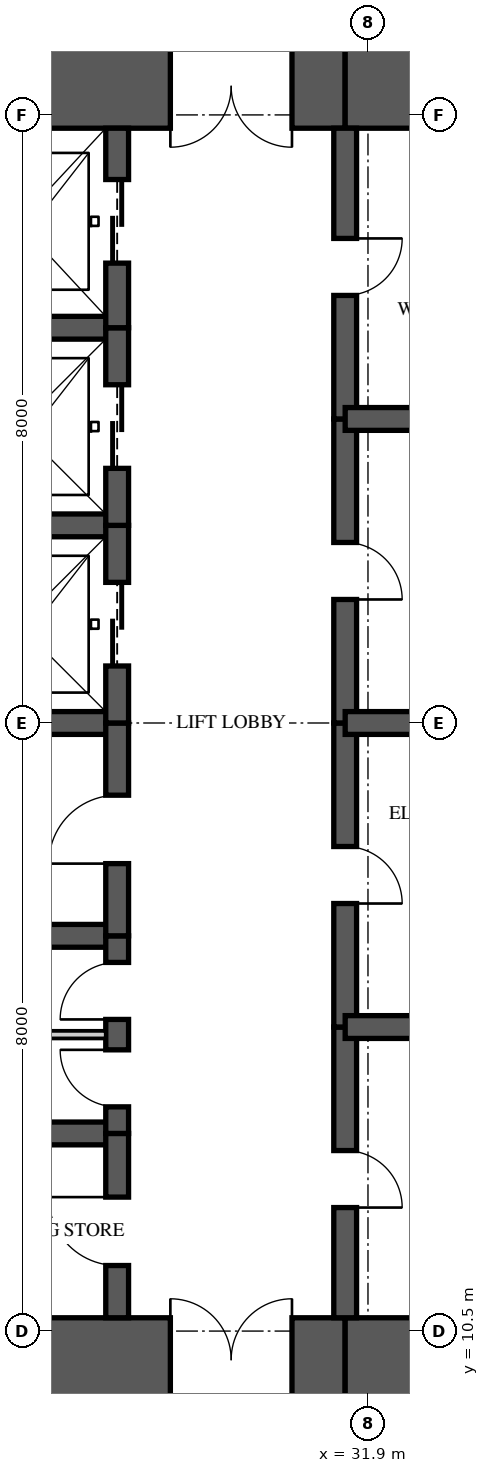
"""IFC4 building model, lengths in metres.
Left out: names, types, materials, properties, quantities, classifications, styles, units other than length and angle.
Written with IfcOpenShell. Run it as: python <this file> out.ifc"""

import sys

from ifc_helpers import new_model, si_unit, direction, frame, frame_2d, origin, place, context, subcontext, project, spatial, rectangle, extrude, element, fill, save


model = new_model("IFC4")
c1 = context("Model", 3, precision=1e-05, world=origin(), true_north=direction((0.0, 1.0)))
c2 = subcontext(c1, "Body", "Model", "MODEL_VIEW")
j1 = project(units=[si_unit("LENGTHUNIT", "METRE"), si_unit("PLANEANGLEUNIT", "RADIAN")], contexts=[c1])
p1 = place(None, origin())
s1 = spatial("IfcSite", under=j1, at=p1, CompositionType="ELEMENT")
p2 = place(p1, origin())
s2 = spatial("IfcBuilding", under=s1, at=p2, CompositionType="ELEMENT")
p3 = place(p2, frame((0.0, 0.0, 221.45)))
s3 = spatial("IfcBuildingStorey", under=s2, at=p3, CompositionType="ELEMENT", Elevation=221.45)
p4 = place(p3, frame((26.0, 10.125, 0.0), z_axis=(0.0, 0.0, 1.0), x_axis=(1.0, 0.0, 0.0)))
e1 = element("IfcWall", 1, at=p4, inside=s3, PredefinedType="SHEAR", context=c2, shape_type="SweptSolid", body=[
    extrude(rectangle(XDim=5.6, YDim=1.1, at=frame_2d((2.8, 0.0))), origin(), (0.0, 0.0, 1.0), 3.5),
])
p5 = place(p4, frame((3.3, 0.0, 0.0)))
e2 = element("IfcOpeningElement", 2, at=p5, cuts=e1, PredefinedType="OPENING", context=c2, shape_type="SweptSolid", body=[
    extrude(rectangle(XDim=1.6, YDim=2.1, at=frame_2d((0.8, 1.05))), frame((0.0, 0.56, 0.0), z_axis=(0.0, -1.0, 0.0), x_axis=(1.0, 0.0, 0.0)), (0.0, 0.0, 1.0), 1.12),
])
for number, where, z_axis, x_axis in (
    (3, (31.6, 10.125, 0.0), (0.0, 0.0, 1.0), (1.0, 0.0, 0.0)),
    (4, (35.9, 26.875, 0.0), (0.0, 0.0, 1.0), (-1.0, 0.0, 0.0)),
):
    element("IfcWall", number, at=place(p3, frame(where, z_axis=z_axis, x_axis=x_axis)), inside=s3, PredefinedType="SHEAR", context=c2, shape_type="SweptSolid", body=[
        extrude(rectangle(XDim=4.3, YDim=1.1, at=frame_2d((2.15, 0.0))), origin(), (0.0, 0.0, 1.0), 3.5),
    ])
p6 = place(p3, frame((31.6, 26.875, 0.0), z_axis=(0.0, 0.0, 1.0), x_axis=(-1.0, 0.0, 0.0)))
e5 = element("IfcWall", 5, at=p6, inside=s3, PredefinedType="SHEAR", context=c2, shape_type="SweptSolid", body=[
    extrude(rectangle(XDim=5.6, YDim=1.1, at=frame_2d((2.8, 0.0))), origin(), (0.0, 0.0, 1.0), 3.5),
])
p7 = place(p6, frame((0.7, 0.0, 0.0)))
e6 = element("IfcOpeningElement", 6, at=p7, cuts=e5, PredefinedType="OPENING", context=c2, shape_type="SweptSolid", body=[
    extrude(rectangle(XDim=1.6, YDim=2.1, at=frame_2d((0.8, 1.05))), frame((0.0, 0.56, 0.0), z_axis=(0.0, -1.0, 0.0), x_axis=(1.0, 0.0, 0.0)), (0.0, 0.0, 1.0), 1.12),
])
p8 = place(p3, frame((28.6, 10.675, 0.0), z_axis=(0.0, 0.0, 1.0), x_axis=(0.0, 1.0, 0.0)))
e7 = element("IfcWall", 7, at=p8, inside=s3, PredefinedType="SHEAR", context=c2, shape_type="SweptSolid", body=[
    extrude(rectangle(XDim=2.425, YDim=0.3, at=frame_2d((1.212, 0.0))), origin(), (0.0, 0.0, 1.0), 3.5),
])
p9 = place(p8, frame((0.688, 0.0, 0.0)))
e8 = element("IfcOpeningElement", 8, at=p9, cuts=e7, PredefinedType="OPENING", context=c2, shape_type="SweptSolid", body=[
    extrude(rectangle(XDim=0.9, YDim=2.1, at=frame_2d((0.45, 1.05))), frame((0.0, 0.16, 0.0), z_axis=(0.0, -1.0, 0.0), x_axis=(1.0, 0.0, 0.0)), (0.0, 0.0, 1.0), 0.32),
])
p10 = place(p3, frame((28.6, 13.1, 0.0), z_axis=(0.0, 0.0, 1.0), x_axis=(0.0, 1.0, 0.0)))
e9 = element("IfcWall", 9, at=p10, inside=s3, PredefinedType="SHEAR", context=c2, shape_type="SweptSolid", body=[
    extrude(rectangle(XDim=2.6, YDim=0.3, at=frame_2d((1.3, 0.0))), origin(), (0.0, 0.0, 1.0), 3.5),
])
p11 = place(p10, frame((0.35, 0.0, 0.0)))
e10 = element("IfcOpeningElement", 10, at=p11, cuts=e9, PredefinedType="OPENING", context=c2, shape_type="SweptSolid", body=[
    extrude(rectangle(XDim=0.75, YDim=2.1, at=frame_2d((0.375, 1.05))), frame((0.0, 0.16, 0.0), z_axis=(0.0, -1.0, 0.0), x_axis=(1.0, 0.0, 0.0)), (0.0, 0.0, 1.0), 0.32),
])
p12 = place(p10, frame((1.5, 0.0, 0.0)))
e11 = element("IfcOpeningElement", 11, at=p12, cuts=e9, PredefinedType="OPENING", context=c2, shape_type="SweptSolid", body=[
    extrude(rectangle(XDim=0.75, YDim=2.1, at=frame_2d((0.375, 1.05))), frame((0.0, 0.16, 0.0), z_axis=(0.0, -1.0, 0.0), x_axis=(1.0, 0.0, 0.0)), (0.0, 0.0, 1.0), 0.32),
])
p13 = place(p3, frame((28.6, 15.7, 0.0), z_axis=(0.0, 0.0, 1.0), x_axis=(0.0, 1.0, 0.0)))
e12 = element("IfcWall", 12, at=p13, inside=s3, PredefinedType="SHEAR", context=c2, shape_type="SweptSolid", body=[
    extrude(rectangle(XDim=2.8, YDim=0.3, at=frame_2d((1.4, 0.0))), origin(), (0.0, 0.0, 1.0), 3.5),
])
p14 = place(p13, frame((0.95, 0.0, 0.0)))
e13 = element("IfcOpeningElement", 13, at=p14, cuts=e12, PredefinedType="OPENING", context=c2, shape_type="SweptSolid", body=[
    extrude(rectangle(XDim=0.9, YDim=2.1, at=frame_2d((0.45, 1.05))), frame((0.0, 0.16, 0.0), z_axis=(0.0, -1.0, 0.0), x_axis=(1.0, 0.0, 0.0)), (0.0, 0.0, 1.0), 0.32),
])
p15 = place(p3, frame((28.6, 18.5, 0.0), z_axis=(0.0, 0.0, 1.0), x_axis=(0.0, 1.0, 0.0)))
e14 = element("IfcWall", 14, at=p15, inside=s3, PredefinedType="SHEAR", context=c2, shape_type="SweptSolid", body=[
    extrude(rectangle(XDim=2.6, YDim=0.3, at=frame_2d((1.3, 0.0))), origin(), (0.0, 0.0, 1.0), 3.5),
])
p16 = place(p15, frame((0.75, 0.0, 0.0)))
e15 = element("IfcOpeningElement", 15, at=p16, cuts=e14, PredefinedType="OPENING", context=c2, shape_type="SweptSolid", body=[
    extrude(rectangle(XDim=1.1, YDim=2.1, at=frame_2d((0.55, 1.05))), frame((0.0, 0.16, 0.0), z_axis=(0.0, -1.0, 0.0), x_axis=(1.0, 0.0, 0.0)), (0.0, 0.0, 1.0), 0.32),
])
p17 = place(p3, frame((28.6, 21.1, 0.0), z_axis=(0.0, 0.0, 1.0), x_axis=(0.0, 1.0, 0.0)))
e16 = element("IfcWall", 16, at=p17, inside=s3, PredefinedType="SHEAR", context=c2, shape_type="SweptSolid", body=[
    extrude(rectangle(XDim=2.6, YDim=0.3, at=frame_2d((1.3, 0.0))), origin(), (0.0, 0.0, 1.0), 3.5),
])
p18 = place(p17, frame((0.75, 0.0, 0.0)))
e17 = element("IfcOpeningElement", 17, at=p18, cuts=e16, PredefinedType="OPENING", context=c2, shape_type="SweptSolid", body=[
    extrude(rectangle(XDim=1.1, YDim=2.1, at=frame_2d((0.55, 1.05))), frame((0.0, 0.16, 0.0), z_axis=(0.0, -1.0, 0.0), x_axis=(1.0, 0.0, 0.0)), (0.0, 0.0, 1.0), 0.32),
])
p19 = place(p3, frame((28.6, 23.7, 0.0), z_axis=(0.0, 0.0, 1.0), x_axis=(0.0, 1.0, 0.0)))
e18 = element("IfcWall", 18, at=p19, inside=s3, PredefinedType="SHEAR", context=c2, shape_type="SweptSolid", body=[
    extrude(rectangle(XDim=2.625, YDim=0.3, at=frame_2d((1.312, 0.0))), origin(), (0.0, 0.0, 1.0), 3.5),
])
p20 = place(p19, frame((0.85, 0.0, 0.0)))
e19 = element("IfcOpeningElement", 19, at=p20, cuts=e18, PredefinedType="OPENING", context=c2, shape_type="SweptSolid", body=[
    extrude(rectangle(XDim=1.1, YDim=2.1, at=frame_2d((0.55, 1.05))), frame((0.0, 0.16, 0.0), z_axis=(0.0, -1.0, 0.0), x_axis=(1.0, 0.0, 0.0)), (0.0, 0.0, 1.0), 0.32),
])
p21 = place(p3, frame((31.6, 10.675, 0.0), z_axis=(0.0, 0.0, 1.0), x_axis=(0.0, 1.0, 0.0)))
e20 = element("IfcWall", 20, at=p21, inside=s3, PredefinedType="SHEAR", context=c2, shape_type="SweptSolid", body=[
    extrude(rectangle(XDim=3.825, YDim=0.3, at=frame_2d((1.913, 0.0))), origin(), (0.0, 0.0, 1.0), 3.5),
])
p22 = place(p21, frame((1.45, 0.0, 0.0)))
e21 = element("IfcOpeningElement", 21, at=p22, cuts=e20, PredefinedType="OPENING", context=c2, shape_type="SweptSolid", body=[
    extrude(rectangle(XDim=0.75, YDim=2.1, at=frame_2d((0.375, 1.05))), frame((0.0, 0.16, 0.0), z_axis=(0.0, -1.0, 0.0), x_axis=(1.0, 0.0, 0.0)), (0.0, 0.0, 1.0), 0.32),
])
p23 = place(p3, frame((31.6, 14.5, 0.0), z_axis=(0.0, 0.0, 1.0), x_axis=(0.0, 1.0, 0.0)))
e22 = element("IfcWall", 22, at=p23, inside=s3, PredefinedType="SHEAR", context=c2, shape_type="SweptSolid", body=[
    extrude(rectangle(XDim=4.0, YDim=0.3, at=frame_2d((2.0, 0.0))), origin(), (0.0, 0.0, 1.0), 3.5),
])
p24 = place(p23, frame((1.625, 0.0, 0.0)))
e23 = element("IfcOpeningElement", 23, at=p24, cuts=e22, PredefinedType="OPENING", context=c2, shape_type="SweptSolid", body=[
    extrude(rectangle(XDim=0.75, YDim=2.1, at=frame_2d((0.375, 1.05))), frame((0.0, 0.16, 0.0), z_axis=(0.0, -1.0, 0.0), x_axis=(1.0, 0.0, 0.0)), (0.0, 0.0, 1.0), 0.32),
])
p25 = place(p3, frame((31.6, 18.5, 0.0), z_axis=(0.0, 0.0, 1.0), x_axis=(0.0, 1.0, 0.0)))
e24 = element("IfcWall", 24, at=p25, inside=s3, PredefinedType="SHEAR", context=c2, shape_type="SweptSolid", body=[
    extrude(rectangle(XDim=4.0, YDim=0.3, at=frame_2d((2.0, 0.0))), origin(), (0.0, 0.0, 1.0), 3.5),
])
p26 = place(p25, frame((1.625, 0.0, 0.0)))
e25 = element("IfcOpeningElement", 25, at=p26, cuts=e24, PredefinedType="OPENING", context=c2, shape_type="SweptSolid", body=[
    extrude(rectangle(XDim=0.75, YDim=2.1, at=frame_2d((0.375, 1.05))), frame((0.0, 0.16, 0.0), z_axis=(0.0, -1.0, 0.0), x_axis=(1.0, 0.0, 0.0)), (0.0, 0.0, 1.0), 0.32),
])
p27 = place(p3, frame((31.6, 22.5, 0.0), z_axis=(0.0, 0.0, 1.0), x_axis=(0.0, 1.0, 0.0)))
e26 = element("IfcWall", 26, at=p27, inside=s3, PredefinedType="SHEAR", context=c2, shape_type="SweptSolid", body=[
    extrude(rectangle(XDim=3.825, YDim=0.3, at=frame_2d((1.913, 0.0))), origin(), (0.0, 0.0, 1.0), 3.5),
])
p28 = place(p27, frame((1.625, 0.0, 0.0)))
e27 = element("IfcOpeningElement", 27, at=p28, cuts=e26, PredefinedType="OPENING", context=c2, shape_type="SweptSolid", body=[
    extrude(rectangle(XDim=0.75, YDim=2.1, at=frame_2d((0.375, 1.05))), frame((0.0, 0.16, 0.0), z_axis=(0.0, -1.0, 0.0), x_axis=(1.0, 0.0, 0.0)), (0.0, 0.0, 1.0), 0.32),
])
for number, where, z_axis, x_axis in (
    (28, (26.0, 13.1, 0.0), (0.0, 0.0, 1.0), (1.0, 0.0, 0.0)),
    (29, (26.0, 15.7, 0.0), (0.0, 0.0, 1.0), (1.0, 0.0, 0.0)),
    (30, (26.0, 18.5, 0.0), (0.0, 0.0, 1.0), (1.0, 0.0, 0.0)),
    (31, (26.0, 21.1, 0.0), (0.0, 0.0, 1.0), (1.0, 0.0, 0.0)),
    (32, (26.0, 23.7, 0.0), (0.0, 0.0, 1.0), (1.0, 0.0, 0.0)),
):
    element("IfcWall", number, at=place(p3, frame(where, z_axis=z_axis, x_axis=x_axis)), inside=s3, PredefinedType="SHEAR", context=c2, shape_type="SweptSolid", body=[
        extrude(rectangle(XDim=2.6, YDim=0.3, at=frame_2d((1.3, 0.0))), origin(), (0.0, 0.0, 1.0), 3.5),
    ])
for number, where, z_axis, x_axis in (
    (33, (31.6, 14.5, 0.0), (0.0, 0.0, 1.0), (1.0, 0.0, 0.0)),
    (34, (31.6, 18.5, 0.0), (0.0, 0.0, 1.0), (1.0, 0.0, 0.0)),
    (35, (31.6, 22.5, 0.0), (0.0, 0.0, 1.0), (1.0, 0.0, 0.0)),
):
    element("IfcWall", number, at=place(p3, frame(where, z_axis=z_axis, x_axis=x_axis)), inside=s3, PredefinedType="SHEAR", context=c2, shape_type="SweptSolid", body=[
        extrude(rectangle(XDim=4.3, YDim=0.3, at=frame_2d((2.15, 0.0))), origin(), (0.0, 0.0, 1.0), 3.5),
    ])
p29 = place(p3, frame((26.15, 14.4, 0.0), z_axis=(0.0, 0.0, 1.0), x_axis=(1.0, 0.0, 0.0)))
e36 = element("IfcWall", 36, at=p29, inside=s3, PredefinedType="PARTITIONING", context=c2, shape_type="SweptSolid", body=[
    extrude(rectangle(XDim=2.3, YDim=0.1, at=frame_2d((1.15, 0.0))), origin(), (0.0, 0.0, 1.0), 3.26),
])
p30 = place(p16, origin())
e37 = element("IfcDoor", 37, at=p30, inside=s3, OperationType="SLIDING_TO_LEFT", PredefinedType="DOOR", context=c2, shape_type="SweptSolid", body=[
    extrude(rectangle(XDim=1.1, YDim=2.1, at=frame_2d((0.55, 1.05))), frame((0.0, 0.025, 0.0), z_axis=(0.0, -1.0, 0.0), x_axis=(1.0, 0.0, 0.0)), (0.0, 0.0, 1.0), 0.05),
])
fill(e15, e37)
p31 = place(p18, origin())
e38 = element("IfcDoor", 38, at=p31, inside=s3, OperationType="SLIDING_TO_LEFT", PredefinedType="DOOR", context=c2, shape_type="SweptSolid", body=[
    extrude(rectangle(XDim=1.1, YDim=2.1, at=frame_2d((0.55, 1.05))), frame((0.0, 0.025, 0.0), z_axis=(0.0, -1.0, 0.0), x_axis=(1.0, 0.0, 0.0)), (0.0, 0.0, 1.0), 0.05),
])
fill(e17, e38)
p32 = place(p20, origin())
e39 = element("IfcDoor", 39, at=p32, inside=s3, OperationType="SLIDING_TO_LEFT", PredefinedType="DOOR", context=c2, shape_type="SweptSolid", body=[
    extrude(rectangle(XDim=1.1, YDim=2.1, at=frame_2d((0.55, 1.05))), frame((0.0, 0.025, 0.0), z_axis=(0.0, -1.0, 0.0), x_axis=(1.0, 0.0, 0.0)), (0.0, 0.0, 1.0), 0.05),
])
fill(e19, e39)
p33 = place(p9, origin())
e40 = element("IfcDoor", 40, at=p33, inside=s3, OperationType="SINGLE_SWING_RIGHT", PredefinedType="DOOR", context=c2, shape_type="SweptSolid", body=[
    extrude(rectangle(XDim=0.9, YDim=2.1, at=frame_2d((0.45, 1.05))), frame((0.0, 0.025, 0.0), z_axis=(0.0, -1.0, 0.0), x_axis=(1.0, 0.0, 0.0)), (0.0, 0.0, 1.0), 0.05),
])
fill(e8, e40)
p34 = place(p11, origin())
e41 = element("IfcDoor", 41, at=p34, inside=s3, OperationType="SINGLE_SWING_RIGHT", PredefinedType="DOOR", context=c2, shape_type="SweptSolid", body=[
    extrude(rectangle(XDim=0.75, YDim=2.1, at=frame_2d((0.375, 1.05))), frame((0.0, 0.025, 0.0), z_axis=(0.0, -1.0, 0.0), x_axis=(1.0, 0.0, 0.0)), (0.0, 0.0, 1.0), 0.05),
])
fill(e10, e41)
p35 = place(p12, origin())
e42 = element("IfcDoor", 42, at=p35, inside=s3, OperationType="SINGLE_SWING_LEFT", PredefinedType="DOOR", context=c2, shape_type="SweptSolid", body=[
    extrude(rectangle(XDim=0.75, YDim=2.1, at=frame_2d((0.375, 1.05))), frame((0.0, 0.025, 0.0), z_axis=(0.0, -1.0, 0.0), x_axis=(1.0, 0.0, 0.0)), (0.0, 0.0, 1.0), 0.05),
])
fill(e11, e42)
p36 = place(p14, origin())
e43 = element("IfcDoor", 43, at=p36, inside=s3, OperationType="SINGLE_SWING_LEFT", PredefinedType="DOOR", context=c2, shape_type="SweptSolid", body=[
    extrude(rectangle(XDim=0.9, YDim=2.1, at=frame_2d((0.45, 1.05))), frame((0.0, 0.025, 0.0), z_axis=(0.0, -1.0, 0.0), x_axis=(1.0, 0.0, 0.0)), (0.0, 0.0, 1.0), 0.05),
])
fill(e13, e43)
p37 = place(p5, origin())
e44 = element("IfcDoor", 44, at=p37, inside=s3, OperationType="DOUBLE_DOOR_SINGLE_SWING", PredefinedType="DOOR", context=c2, shape_type="SweptSolid", body=[
    extrude(rectangle(XDim=1.6, YDim=2.1, at=frame_2d((0.8, 1.05))), frame((0.0, 0.025, 0.0), z_axis=(0.0, -1.0, 0.0), x_axis=(1.0, 0.0, 0.0)), (0.0, 0.0, 1.0), 0.05),
])
fill(e2, e44)
p38 = place(p7, origin())
e45 = element("IfcDoor", 45, at=p38, inside=s3, OperationType="DOUBLE_DOOR_SINGLE_SWING", PredefinedType="DOOR", context=c2, shape_type="SweptSolid", body=[
    extrude(rectangle(XDim=1.6, YDim=2.1, at=frame_2d((0.8, 1.05))), frame((0.0, 0.025, 0.0), z_axis=(0.0, -1.0, 0.0), x_axis=(1.0, 0.0, 0.0)), (0.0, 0.0, 1.0), 0.05),
])
fill(e6, e45)
p39 = place(p22, frame((0.75, 0.0, 0.0), z_axis=(0.0, 0.0, 1.0), x_axis=(-1.0, 0.0, 0.0)))
e46 = element("IfcDoor", 46, at=p39, inside=s3, OperationType="SINGLE_SWING_RIGHT", PredefinedType="DOOR", context=c2, shape_type="SweptSolid", body=[
    extrude(rectangle(XDim=0.75, YDim=2.1, at=frame_2d((0.375, 1.05))), frame((0.0, 0.025, 0.0), z_axis=(0.0, -1.0, 0.0), x_axis=(1.0, 0.0, 0.0)), (0.0, 0.0, 1.0), 0.05),
])
fill(e21, e46)
p40 = place(p24, frame((0.75, 0.0, 0.0), z_axis=(0.0, 0.0, 1.0), x_axis=(-1.0, 0.0, 0.0)))
e47 = element("IfcDoor", 47, at=p40, inside=s3, OperationType="SINGLE_SWING_RIGHT", PredefinedType="DOOR", context=c2, shape_type="SweptSolid", body=[
    extrude(rectangle(XDim=0.75, YDim=2.1, at=frame_2d((0.375, 1.05))), frame((0.0, 0.025, 0.0), z_axis=(0.0, -1.0, 0.0), x_axis=(1.0, 0.0, 0.0)), (0.0, 0.0, 1.0), 0.05),
])
fill(e23, e47)
p41 = place(p26, frame((0.75, 0.0, 0.0), z_axis=(0.0, 0.0, 1.0), x_axis=(-1.0, 0.0, 0.0)))
e48 = element("IfcDoor", 48, at=p41, inside=s3, OperationType="SINGLE_SWING_RIGHT", PredefinedType="DOOR", context=c2, shape_type="SweptSolid", body=[
    extrude(rectangle(XDim=0.75, YDim=2.1, at=frame_2d((0.375, 1.05))), frame((0.0, 0.025, 0.0), z_axis=(0.0, -1.0, 0.0), x_axis=(1.0, 0.0, 0.0)), (0.0, 0.0, 1.0), 0.05),
])
fill(e25, e48)
p42 = place(p28, frame((0.75, 0.0, 0.0), z_axis=(0.0, 0.0, 1.0), x_axis=(-1.0, 0.0, 0.0)))
e49 = element("IfcDoor", 49, at=p42, inside=s3, OperationType="SINGLE_SWING_LEFT", PredefinedType="DOOR", context=c2, shape_type="SweptSolid", body=[
    extrude(rectangle(XDim=0.75, YDim=2.1, at=frame_2d((0.375, 1.05))), frame((0.0, 0.025, 0.0), z_axis=(0.0, -1.0, 0.0), x_axis=(1.0, 0.0, 0.0)), (0.0, 0.0, 1.0), 0.05),
])
fill(e27, e49)
save(model, sys.argv[1])
